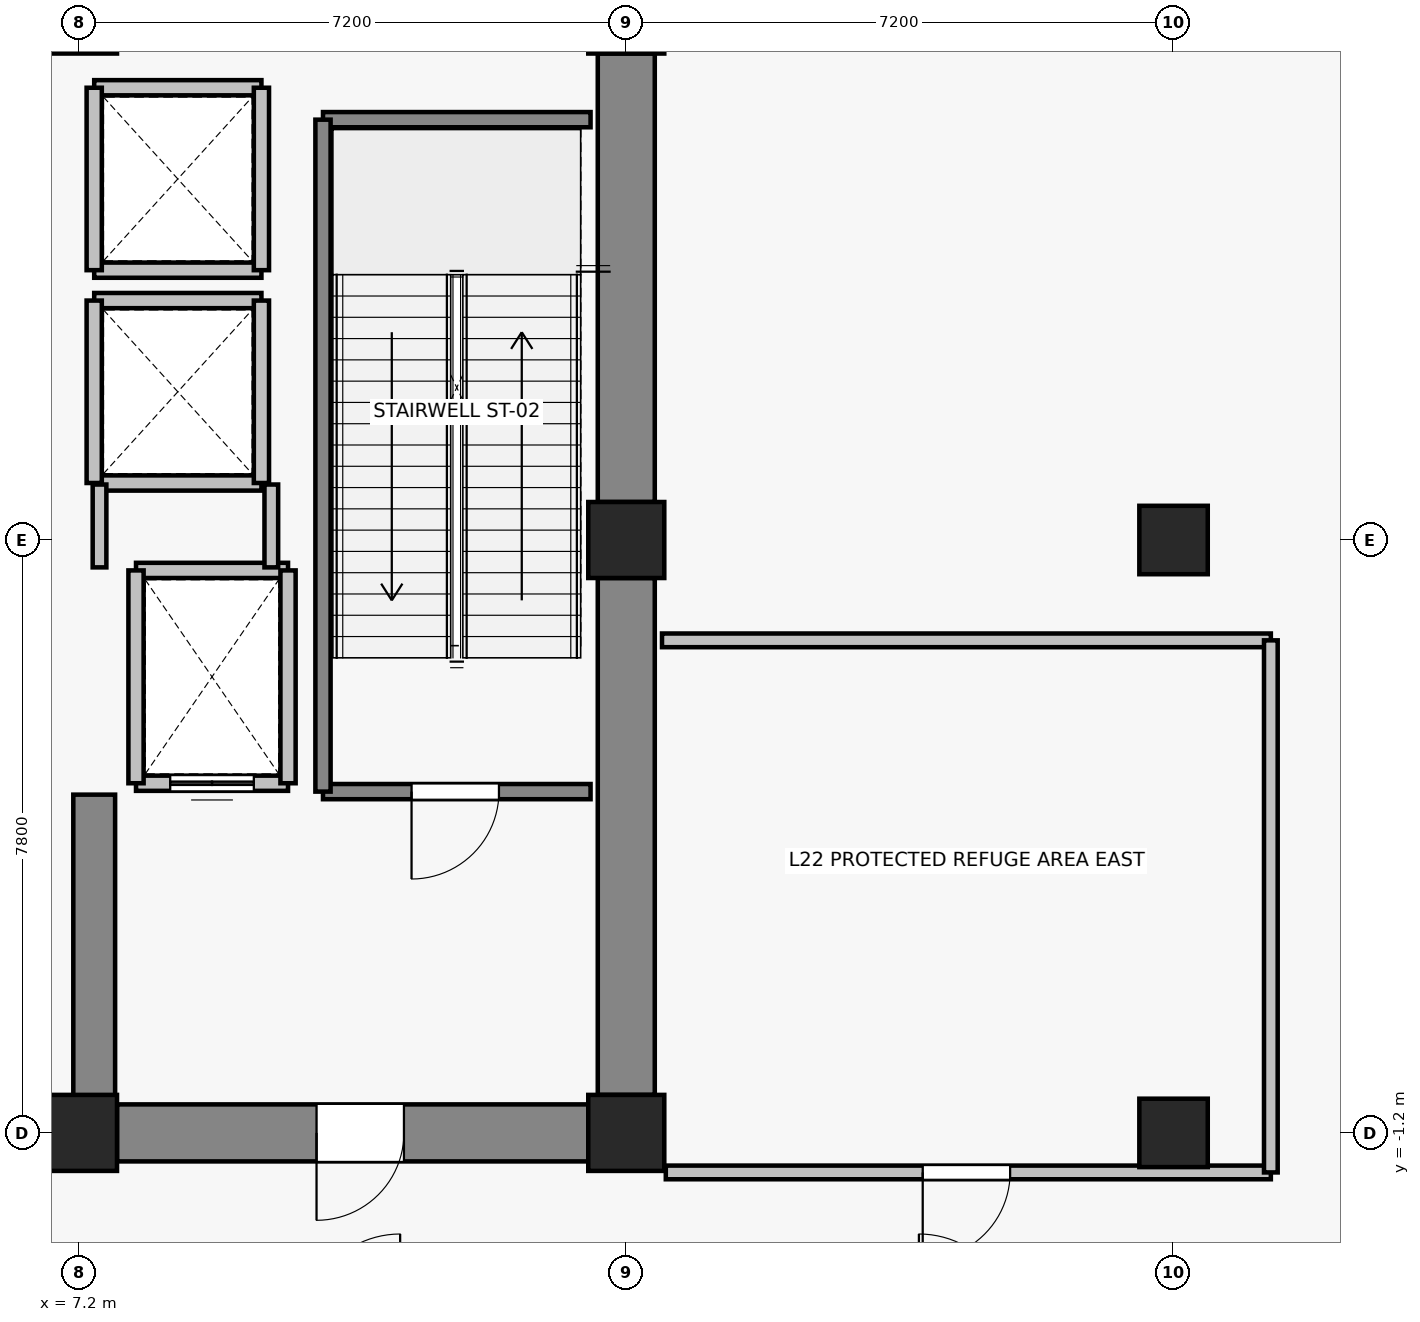
"""IFC4 building model, lengths in metres.
Left out: names, types, materials, properties, quantities, classifications, styles, units other than length and angle.
Written with IfcOpenShell. Run it as: python <this file> out.ifc"""

import sys

from ifc_helpers import new_model, si_unit, direction, frame, frame_2d, origin, origin_2d, place, context, subcontext, project, spatial, rectangle, extrude, source, transform, mapped, element, fill, save


model = new_model("IFC4")
c1 = context("Model", 3, precision=1e-05, world=origin(), true_north=direction((0.0, 1.0)))
c2 = subcontext(c1, "Body", "Model", "MODEL_VIEW")
j1 = project(units=[si_unit("LENGTHUNIT", "METRE"), si_unit("PLANEANGLEUNIT", "RADIAN")], contexts=[c1])
p1 = place(None, origin())
s1 = spatial("IfcSite", under=j1, at=p1, CompositionType="ELEMENT")
p2 = place(p1, origin())
s2 = spatial("IfcBuilding", under=s1, at=p2, CompositionType="ELEMENT")
p3 = place(p2, frame((0.0, 0.0, 80.2)))
s3 = spatial("IfcBuildingStorey", under=s2, at=p3, CompositionType="ELEMENT", Elevation=80.2)
for number, where, z_axis, x_axis in (
    (1, (7.2, -1.2, 0.0), (0.0, 0.0, 1.0), (1.0, 0.0, 0.0)),
    (2, (14.4, -1.2, 0.0), (0.0, 0.0, 1.0), (1.0, 0.0, 0.0)),
    (3, (14.4, 6.6, 0.0), (0.0, 0.0, 1.0), (1.0, 0.0, 0.0)),
    (4, (7.2, 13.5, 0.0), (0.0, 0.0, 1.0), (1.0, 0.0, 0.0)),
    (5, (14.4, 13.5, 0.0), (0.0, 0.0, 1.0), (1.0, 0.0, 0.0)),
):
    element("IfcColumn", number, at=place(p3, frame(where, z_axis=z_axis, x_axis=x_axis)), inside=s3, PredefinedType="COLUMN", context=c2, shape_type="SweptSolid", body=[
        extrude(rectangle(XDim=1.0, YDim=1.0, at=origin_2d()), origin(), (0.0, 0.0, 1.0), 6.6),
    ])
for number, where, z_axis, x_axis in (
    (6, (21.6, -1.2, 0.0), (0.0, 0.0, 1.0), (1.0, 0.0, 0.0)),
    (7, (21.6, 6.6, 0.0), (0.0, 0.0, 1.0), (1.0, 0.0, 0.0)),
):
    element("IfcColumn", number, at=place(p3, frame(where, z_axis=z_axis, x_axis=x_axis)), inside=s3, PredefinedType="COLUMN", context=c2, shape_type="SweptSolid", body=[
        extrude(rectangle(XDim=0.9, YDim=0.9, at=origin_2d()), origin(), (0.0, 0.0, 1.0), 6.6),
    ])
p4 = place(p3, frame((14.4, -0.7, 0.0), z_axis=(0.0, 0.0, 1.0), x_axis=(0.0, 1.0, 0.0)))
e8 = element("IfcWall", 8, at=p4, inside=s3, PredefinedType="SHEAR", context=c2, shape_type="SweptSolid", body=[
    extrude(rectangle(XDim=6.8, YDim=0.75, at=frame_2d((3.4, 0.0))), origin(), (0.0, 0.0, 1.0), 6.35),
])
p5 = place(p3, frame((14.4, 7.1, 0.0), z_axis=(0.0, 0.0, 1.0), x_axis=(0.0, 1.0, 0.0)))
e9 = element("IfcWall", 9, at=p5, inside=s3, PredefinedType="SHEAR", context=c2, shape_type="SweptSolid", body=[
    extrude(rectangle(XDim=5.9, YDim=0.75, at=frame_2d((2.95, 0.0))), origin(), (0.0, 0.0, 1.0), 6.35),
])
p6 = place(p3, frame((13.9, -1.2, 0.0), z_axis=(0.0, 0.0, 1.0), x_axis=(-1.0, 0.0, 0.0)))
e10 = element("IfcWall", 10, at=p6, inside=s3, PredefinedType="SHEAR", context=c2, shape_type="SweptSolid", body=[
    extrude(rectangle(XDim=6.2, YDim=0.75, at=frame_2d((3.1, 0.0))), origin(), (0.0, 0.0, 1.0), 6.35),
])
p7 = place(p6, frame((2.425, 0.0, 0.0)))
e11 = element("IfcOpeningElement", 11, at=p7, cuts=e10, PredefinedType="OPENING", context=c2, shape_type="SweptSolid", body=[
    extrude(rectangle(XDim=1.15, YDim=2.15, at=frame_2d((0.575, 1.075))), frame((0.0, 0.385, 0.0), z_axis=(0.0, -1.0, 0.0), x_axis=(1.0, 0.0, 0.0)), (0.0, 0.0, 1.0), 0.77),
])
p8 = place(p3, frame((7.4, -0.825, 0.0), z_axis=(0.0, 0.0, 1.0), x_axis=(0.0, 1.0, 0.0)))
e12 = element("IfcWall", 12, at=p8, inside=s3, PredefinedType="SHEAR", context=c2, shape_type="SweptSolid", body=[
    extrude(rectangle(XDim=4.075, YDim=0.55, at=frame_2d((2.038, 0.0))), origin(), (0.0, 0.0, 1.0), 6.35),
])
p9 = place(p3, frame((9.95, 3.4, 0.0), z_axis=(0.0, 0.0, 1.0), x_axis=(-1.0, 0.0, 0.0)))
e13 = element("IfcWall", 13, at=p9, inside=s3, PredefinedType="SOLIDWALL", context=c2, shape_type="SweptSolid", body=[
    extrude(rectangle(XDim=2.0, YDim=0.2, at=frame_2d((1.0, 0.0))), origin(), (0.0, 0.0, 1.0), 6.35),
])
p10 = place(p9, frame((0.45, 0.0, 0.0)))
e14 = element("IfcOpeningElement", 14, at=p10, cuts=e13, PredefinedType="OPENING", context=c2, shape_type="SweptSolid", body=[
    extrude(rectangle(XDim=1.1, YDim=2.2, at=frame_2d((0.55, 1.1))), frame((0.0, 0.11, 0.0), z_axis=(0.0, -1.0, 0.0), x_axis=(1.0, 0.0, 0.0)), (0.0, 0.0, 1.0), 0.22),
])
p11 = place(p3, frame((7.95, 6.2, 0.0), z_axis=(0.0, 0.0, 1.0), x_axis=(1.0, 0.0, 0.0)))
e15 = element("IfcWall", 15, at=p11, inside=s3, PredefinedType="SOLIDWALL", context=c2, shape_type="SweptSolid", body=[
    extrude(rectangle(XDim=2.0, YDim=0.2, at=frame_2d((1.0, 0.0))), origin(), (0.0, 0.0, 1.0), 6.35),
])
for number, where, z_axis, x_axis in (
    (16, (7.95, 3.4, 0.0), (0.0, 0.0, 1.0), (0.0, 1.0, 0.0)),
    (17, (9.95, 6.2, 0.0), (0.0, 0.0, 1.0), (0.0, -1.0, 0.0)),
):
    element("IfcWall", number, at=place(p3, frame(where, z_axis=z_axis, x_axis=x_axis)), inside=s3, PredefinedType="SOLIDWALL", context=c2, shape_type="SweptSolid", body=[
        extrude(rectangle(XDim=2.8, YDim=0.2, at=frame_2d((1.4, 0.0))), origin(), (0.0, 0.0, 1.0), 6.35),
    ])
for number, where, z_axis, x_axis in (
    (18, (9.6, 7.35, 0.0), (0.0, 0.0, 1.0), (-1.0, 0.0, 0.0)),
    (19, (7.4, 9.75, 0.0), (0.0, 0.0, 1.0), (1.0, 0.0, 0.0)),
):
    element("IfcWall", number, at=place(p3, frame(where, z_axis=z_axis, x_axis=x_axis)), inside=s3, PredefinedType="SOLIDWALL", context=c2, shape_type="SweptSolid", body=[
        extrude(rectangle(XDim=2.2, YDim=0.2, at=frame_2d((1.1, 0.0))), origin(), (0.0, 0.0, 1.0), 5.79),
    ])
p12 = place(p3, frame((7.4, 7.35, 0.0), z_axis=(0.0, 0.0, 1.0), x_axis=(0.0, 1.0, 0.0)))
e20 = element("IfcWall", 20, at=p12, inside=s3, PredefinedType="SOLIDWALL", context=c2, shape_type="SweptSolid", body=[
    extrude(rectangle(XDim=2.4, YDim=0.2, at=frame_2d((1.2, 0.0))), origin(), (0.0, 0.0, 1.0), 5.79),
])
p13 = place(p3, frame((9.6, 9.75, 0.0), z_axis=(0.0, 0.0, 1.0), x_axis=(0.0, -1.0, 0.0)))
e21 = element("IfcWall", 21, at=p13, inside=s3, PredefinedType="SOLIDWALL", context=c2, shape_type="SweptSolid", body=[
    extrude(rectangle(XDim=2.4, YDim=0.2, at=frame_2d((1.2, 0.0))), origin(), (0.0, 0.0, 1.0), 6.35),
])
for number, where, z_axis, x_axis in (
    (22, (9.6, 10.15, 0.0), (0.0, 0.0, 1.0), (-1.0, 0.0, 0.0)),
    (23, (7.4, 12.55, 0.0), (0.0, 0.0, 1.0), (1.0, 0.0, 0.0)),
):
    element("IfcWall", number, at=place(p3, frame(where, z_axis=z_axis, x_axis=x_axis)), inside=s3, PredefinedType="SOLIDWALL", context=c2, shape_type="SweptSolid", body=[
        extrude(rectangle(XDim=2.2, YDim=0.2, at=frame_2d((1.1, 0.0))), origin(), (0.0, 0.0, 1.0), 5.79),
    ])
p14 = place(p3, frame((7.4, 10.15, 0.0), z_axis=(0.0, 0.0, 1.0), x_axis=(0.0, 1.0, 0.0)))
e24 = element("IfcWall", 24, at=p14, inside=s3, PredefinedType="SOLIDWALL", context=c2, shape_type="SweptSolid", body=[
    extrude(rectangle(XDim=2.4, YDim=0.2, at=frame_2d((1.2, 0.0))), origin(), (0.0, 0.0, 1.0), 5.79),
])
p15 = place(p3, frame((9.6, 12.55, 0.0), z_axis=(0.0, 0.0, 1.0), x_axis=(0.0, -1.0, 0.0)))
e25 = element("IfcWall", 25, at=p15, inside=s3, PredefinedType="SOLIDWALL", context=c2, shape_type="SweptSolid", body=[
    extrude(rectangle(XDim=2.4, YDim=0.2, at=frame_2d((1.2, 0.0))), origin(), (0.0, 0.0, 1.0), 6.35),
])
p16 = place(p3, frame((13.93, 3.29, 0.0), z_axis=(0.0, 0.0, 1.0), x_axis=(-1.0, 0.0, 0.0)))
e26 = element("IfcWall", 26, at=p16, inside=s3, PredefinedType="SOLIDWALL", context=c2, shape_type="SweptSolid", body=[
    extrude(rectangle(XDim=3.52, YDim=0.2, at=frame_2d((1.76, 0.0))), origin(), (0.0, 0.0, 1.0), 6.35),
])
p17 = place(p16, frame((1.205, 0.0, 0.0)))
e27 = element("IfcOpeningElement", 27, at=p17, cuts=e26, PredefinedType="OPENING", context=c2, shape_type="SweptSolid", body=[
    extrude(rectangle(XDim=1.15, YDim=2.15, at=frame_2d((0.575, 1.075))), frame((0.0, 0.11, 0.0), z_axis=(0.0, -1.0, 0.0), x_axis=(1.0, 0.0, 0.0)), (0.0, 0.0, 1.0), 0.22),
])
p18 = place(p3, frame((10.41, 12.13, 0.0), z_axis=(0.0, 0.0, 1.0), x_axis=(1.0, 0.0, 0.0)))
e28 = element("IfcWall", 28, at=p18, inside=s3, PredefinedType="SOLIDWALL", context=c2, shape_type="SweptSolid", body=[
    extrude(rectangle(XDim=3.52, YDim=0.2, at=frame_2d((1.76, 0.0))), origin(), (0.0, 0.0, 1.0), 6.35),
])
p19 = place(p3, frame((10.41, 3.29, 0.0), z_axis=(0.0, 0.0, 1.0), x_axis=(0.0, 1.0, 0.0)))
e29 = element("IfcWall", 29, at=p19, inside=s3, PredefinedType="SOLIDWALL", context=c2, shape_type="SweptSolid", body=[
    extrude(rectangle(XDim=8.84, YDim=0.2, at=frame_2d((4.42, 0.0))), origin(), (0.0, 0.0, 1.0), 6.35),
])
p20 = place(p3, frame((7.47, 6.24, 0.0), z_axis=(0.0, 0.0, 1.0), x_axis=(0.0, 1.0, 0.0)))
e30 = element("IfcWall", 30, at=p20, inside=s3, PredefinedType="PARTITIONING", context=c2, shape_type="SweptSolid", body=[
    extrude(rectangle(XDim=1.09, YDim=0.18, at=frame_2d((0.545, 0.0))), origin(), (0.0, 0.0, 1.0), 5.79),
])
p21 = place(p3, frame((9.73, 7.33, 0.0), z_axis=(0.0, 0.0, 1.0), x_axis=(0.0, -1.0, 0.0)))
e31 = element("IfcWall", 31, at=p21, inside=s3, PredefinedType="PARTITIONING", context=c2, shape_type="SweptSolid", body=[
    extrude(rectangle(XDim=1.09, YDim=0.18, at=frame_2d((0.545, 0.0))), origin(), (0.0, 0.0, 1.0), 6.35),
])
p22 = place(p3, frame((22.88, -1.72, 0.0), z_axis=(0.0, 0.0, 1.0), x_axis=(-1.0, 0.0, 0.0)))
e32 = element("IfcWall", 32, at=p22, inside=s3, PredefinedType="PARTITIONING", context=c2, shape_type="SweptSolid", body=[
    extrude(rectangle(XDim=7.96, YDim=0.18, at=frame_2d((3.98, 0.0))), origin(), (0.0, 0.0, 1.0), 5.79),
])
p23 = place(p22, frame((3.43, 0.0, 0.0)))
e33 = element("IfcOpeningElement", 33, at=p23, cuts=e32, PredefinedType="OPENING", context=c2, shape_type="SweptSolid", body=[
    extrude(rectangle(XDim=1.15, YDim=2.15, at=frame_2d((0.575, 1.075))), frame((0.0, 0.1, 0.0), z_axis=(0.0, -1.0, 0.0), x_axis=(1.0, 0.0, 0.0)), (0.0, 0.0, 1.0), 0.2),
])
p24 = place(p3, frame((14.87, 5.28, 0.0), z_axis=(0.0, 0.0, 1.0), x_axis=(1.0, 0.0, 0.0)))
e34 = element("IfcWall", 34, at=p24, inside=s3, PredefinedType="PARTITIONING", context=c2, shape_type="SweptSolid", body=[
    extrude(rectangle(XDim=8.01, YDim=0.18, at=frame_2d((4.005, 0.0))), origin(), (0.0, 0.0, 1.0), 5.79),
])
p25 = place(p3, frame((22.88, 5.28, 0.0), z_axis=(0.0, 0.0, 1.0), x_axis=(0.0, -1.0, 0.0)))
e35 = element("IfcWall", 35, at=p25, inside=s3, PredefinedType="PARTITIONING", context=c2, shape_type="SweptSolid", body=[
    extrude(rectangle(XDim=7.0, YDim=0.18, at=frame_2d((3.5, 0.0))), origin(), (0.0, 0.0, 1.0), 4.89),
])
m1 = source(origin(), c2, "Body", "SweptSolid", [
    extrude(rectangle(XDim=1.1, YDim=2.2, at=frame_2d((0.55, 1.1))), frame((0.0, 0.025, 0.0), z_axis=(0.0, -1.0, 0.0), x_axis=(1.0, 0.0, 0.0)), (0.0, 0.0, 1.0), 0.05),
])
p26 = place(p10, origin())
e36 = element("IfcDoor", 36, at=p26, inside=s3, OperationType="DOUBLE_DOOR_SLIDING", PredefinedType="DOOR", context=c2, shape_type="MappedRepresentation", body=[
    mapped(m1, transform((0.0, 0.0, 0.0), x_axis=(1.0, 0.0, 0.0), y_axis=(0.0, 1.0, 0.0), z_axis=(0.0, 0.0, 1.0), scale=1.0)),
])
fill(e14, e36)
m2 = source(origin(), c2, "Body", "SweptSolid", [
    extrude(rectangle(XDim=1.15, YDim=2.15, at=frame_2d((0.575, 1.075))), frame((0.0, 0.025, 0.0), z_axis=(0.0, -1.0, 0.0), x_axis=(1.0, 0.0, 0.0)), (0.0, 0.0, 1.0), 0.05),
])
p27 = place(p17, origin())
e37 = element("IfcDoor", 37, at=p27, inside=s3, OperationType="SINGLE_SWING_RIGHT", PredefinedType="DOOR", context=c2, shape_type="MappedRepresentation", body=[
    mapped(m2, transform((0.0, 0.0, 0.0), x_axis=(1.0, 0.0, 0.0), y_axis=(0.0, 1.0, 0.0), z_axis=(0.0, 0.0, 1.0), scale=1.0)),
])
fill(e27, e37)
p28 = place(p7, origin())
e38 = element("IfcDoor", 38, at=p28, inside=s3, OperationType="SINGLE_SWING_RIGHT", PredefinedType="DOOR", context=c2, shape_type="MappedRepresentation", body=[
    mapped(m2, transform((0.0, 0.0, 0.0), x_axis=(1.0, 0.0, 0.0), y_axis=(0.0, 1.0, 0.0), z_axis=(0.0, 0.0, 1.0), scale=1.0)),
])
fill(e11, e38)
p29 = place(p23, origin())
e39 = element("IfcDoor", 39, at=p29, inside=s3, OperationType="SINGLE_SWING_RIGHT", PredefinedType="DOOR", context=c2, shape_type="MappedRepresentation", body=[
    mapped(m2, transform((0.0, 0.0, 0.0), x_axis=(1.0, 0.0, 0.0), y_axis=(0.0, 1.0, 0.0), z_axis=(0.0, 0.0, 1.0), scale=1.0)),
])
fill(e33, e39)
save(model, sys.argv[1])
